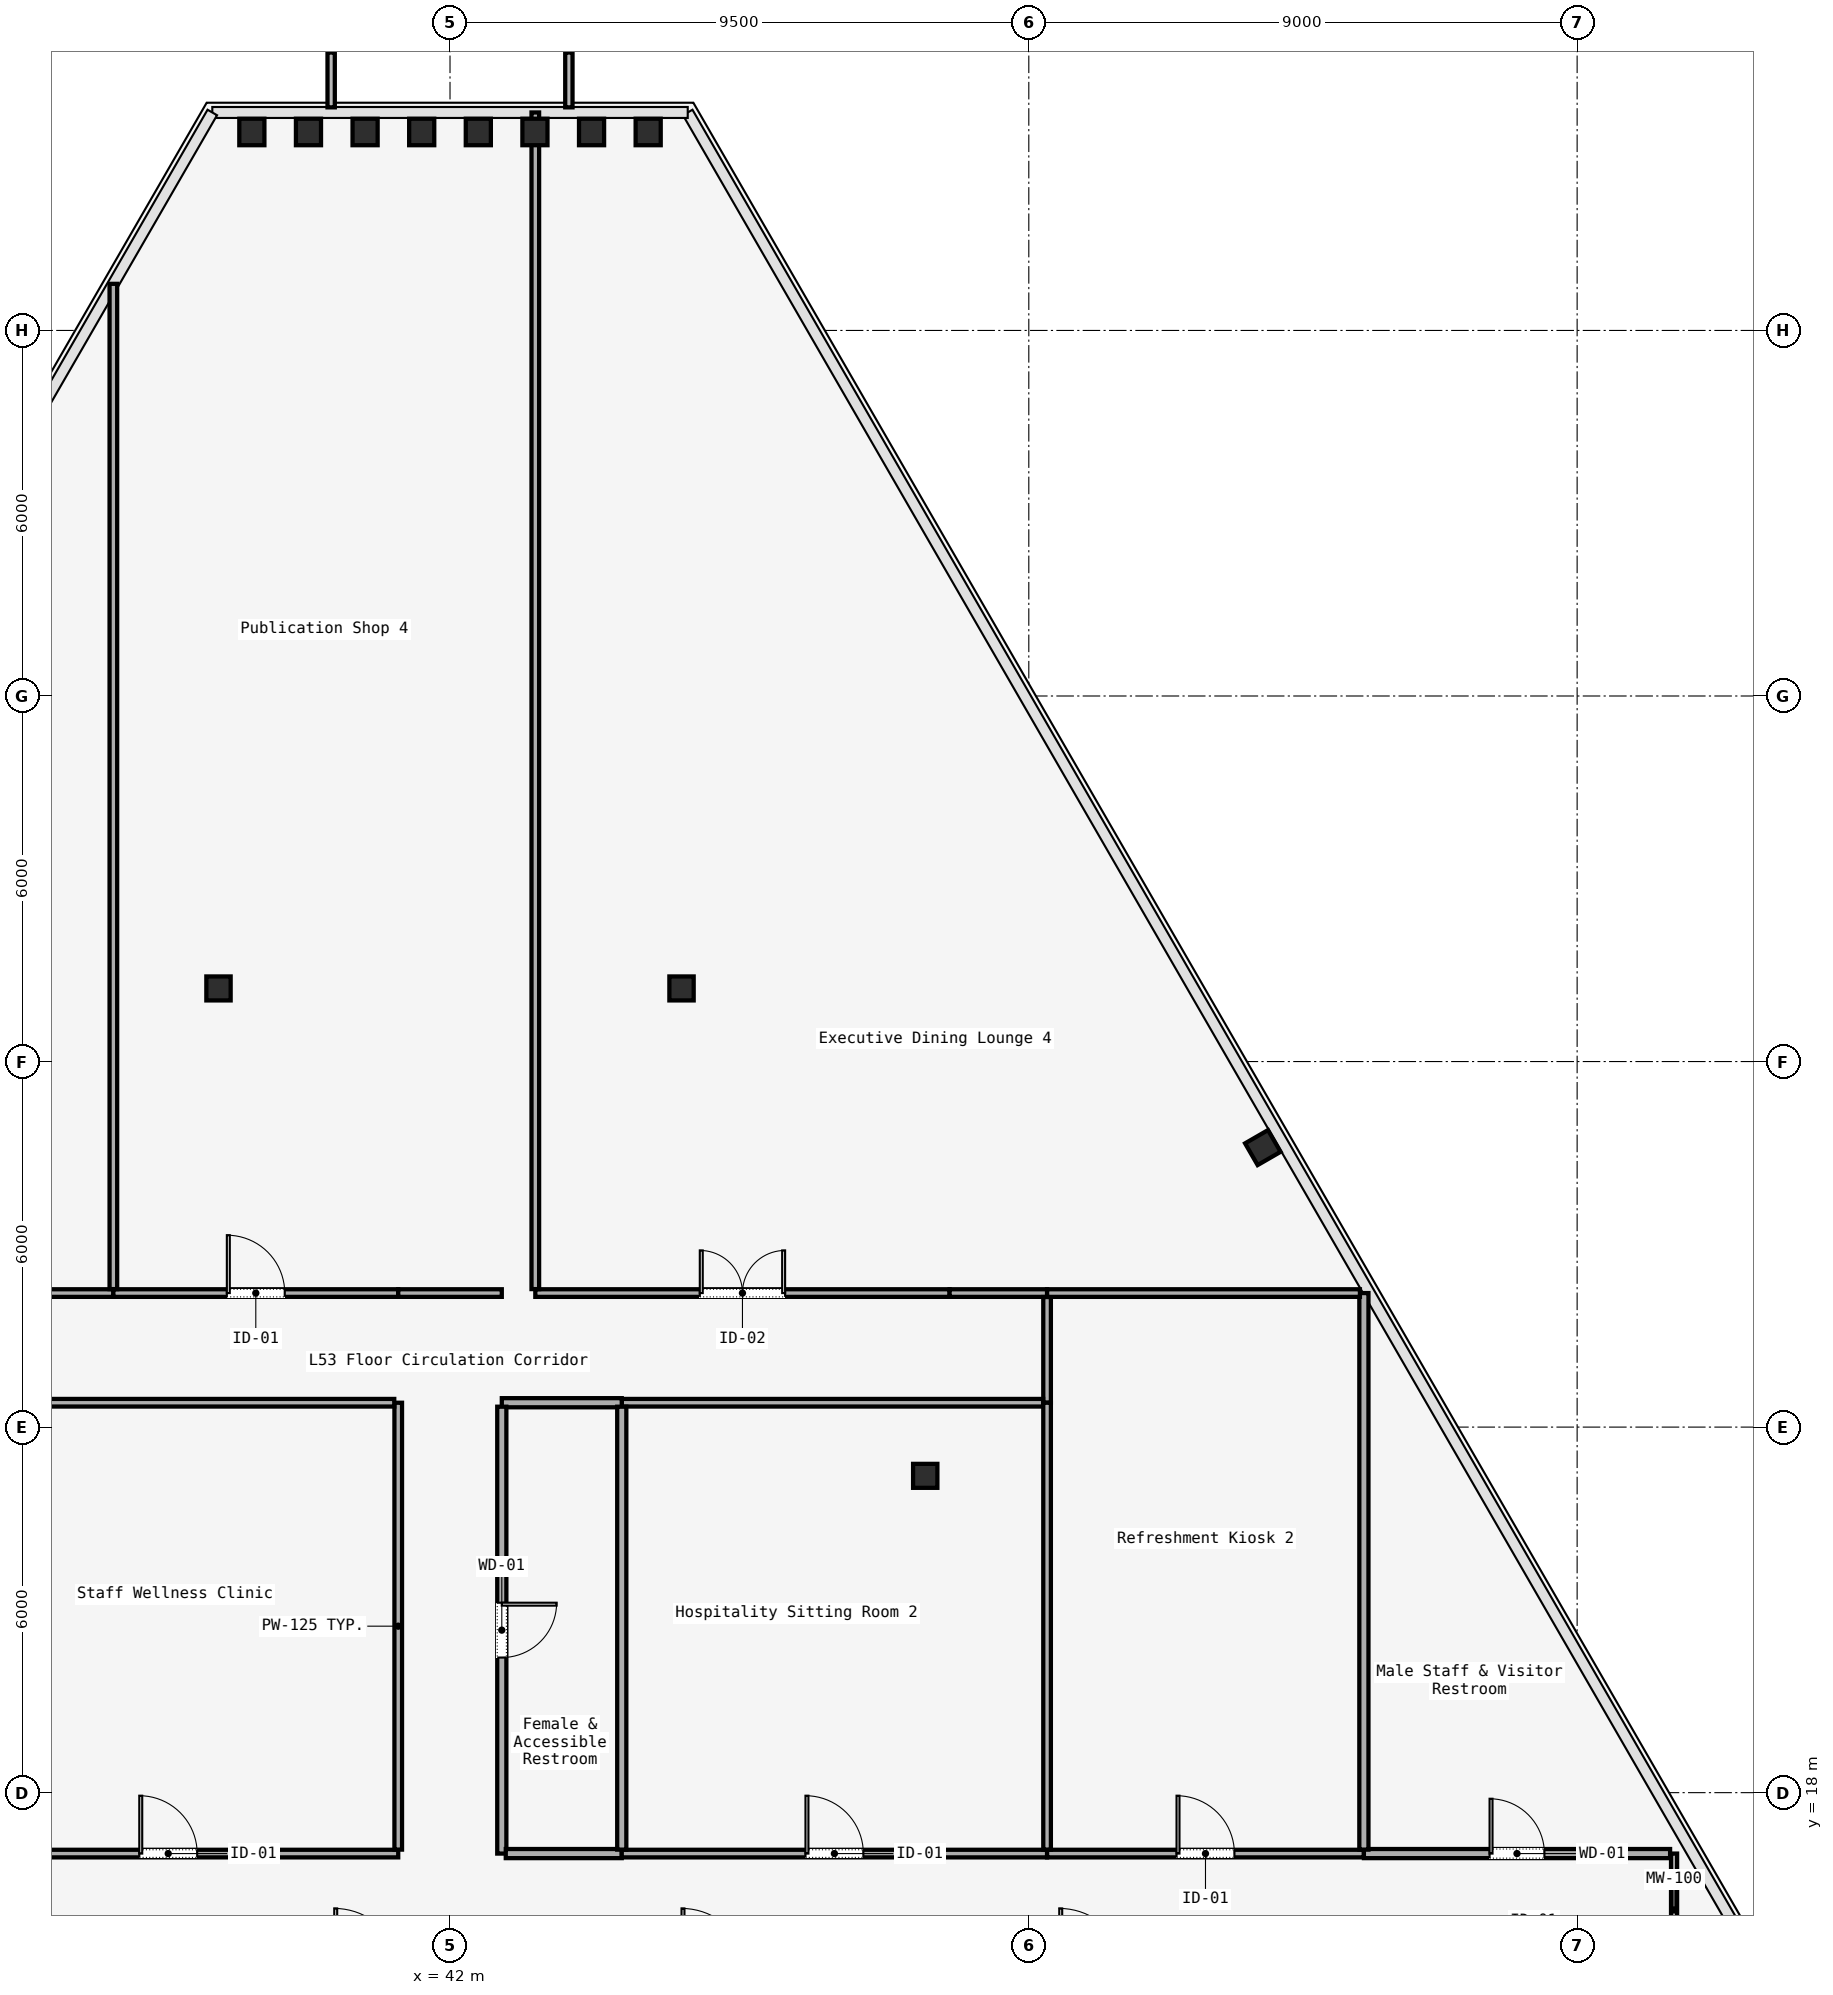
"""IFC4 building model, lengths in metres.
Left out: names, types, materials, properties, quantities, classifications, styles, units other than length and angle.
Written with IfcOpenShell. Run it as: python <this file> out.ifc"""

import sys

from ifc_helpers import new_model, si_unit, direction, frame, frame_2d, origin, origin_2d, place, context, subcontext, project, spatial, rectangle, i_section, extrude, element, fill, save


model = new_model("IFC4")
c1 = context("Model", 3, precision=1e-05, world=origin(), true_north=direction((0.0, 1.0)))
c2 = subcontext(c1, "Body", "Model", "MODEL_VIEW")
j1 = project(units=[si_unit("LENGTHUNIT", "METRE"), si_unit("PLANEANGLEUNIT", "RADIAN")], contexts=[c1])
p1 = place(None, origin())
s1 = spatial("IfcSite", under=j1, at=p1, CompositionType="ELEMENT")
p2 = place(p1, origin())
s2 = spatial("IfcBuilding", under=s1, at=p2, CompositionType="ELEMENT")
p3 = place(p2, frame((0.0, 0.0, 221.8)))
s3 = spatial("IfcBuildingStorey", under=s2, at=p3, CompositionType="ELEMENT", Elevation=221.8)
for number, where, z_axis, x_axis in (
    (1, (49.8, 23.2, 0.0), (0.0, 0.0, 1.0), (1.0, 0.0, 0.0)),
    (2, (38.2, 31.2, 0.0), (0.0, 0.0, 1.0), (1.0, 0.0, 0.0)),
    (3, (45.8, 31.2, 0.0), (0.0, 0.0, 1.0), (1.0, 0.0, 0.0)),
):
    element("IfcColumn", number, at=place(p3, frame(where, z_axis=z_axis, x_axis=x_axis)), inside=s3, PredefinedType="COLUMN", context=c2, shape_type="SweptSolid", body=[
        extrude(i_section(OverallWidth=0.399, OverallDepth=0.394, WebThickness=0.023, FlangeThickness=0.037, FilletRadius=0.015, at=origin_2d()), origin(), (0.0, 0.0, 1.0), 3.58),
    ])
for number, where, z_axis, x_axis in (
    (4, (55.341, 28.588, 0.0), (0.0, 0.0, 1.0), (-0.5, 0.866, 0.0)),
    (5, (45.252, 45.258, 0.0), (0.0, 0.0, 1.0), (1.0, 0.0, 0.0)),
    (6, (44.323, 45.258, 0.0), (0.0, 0.0, 1.0), (1.0, 0.0, 0.0)),
    (7, (43.394, 45.258, 0.0), (0.0, 0.0, 1.0), (1.0, 0.0, 0.0)),
    (8, (42.465, 45.258, 0.0), (0.0, 0.0, 1.0), (1.0, 0.0, 0.0)),
    (9, (41.535, 45.258, 0.0), (0.0, 0.0, 1.0), (1.0, 0.0, 0.0)),
    (10, (40.606, 45.258, 0.0), (0.0, 0.0, 1.0), (1.0, 0.0, 0.0)),
    (11, (39.677, 45.258, 0.0), (0.0, 0.0, 1.0), (1.0, 0.0, 0.0)),
    (12, (38.748, 45.258, 0.0), (0.0, 0.0, 1.0), (1.0, 0.0, 0.0)),
):
    element("IfcColumn", number, at=place(p3, frame(where, z_axis=z_axis, x_axis=x_axis)), inside=s3, PredefinedType="COLUMN", context=c2, shape_type="SweptSolid", body=[
        extrude(i_section(OverallWidth=0.412, OverallDepth=0.435, WebThickness=0.036, FlangeThickness=0.044, FilletRadius=0.015, at=origin_2d()), origin(), (0.0, 0.0, 1.0), 3.58),
    ])
p4 = place(p3, frame((62.091, 17.0, 0.0), z_axis=(0.0, 0.0, 1.0), x_axis=(0.0, -1.0, 0.0)))
e13 = element("IfcWall", 13, at=p4, inside=s3, PredefinedType="MOVABLE", context=c2, shape_type="SweptSolid", body=[
    extrude(rectangle(XDim=1.85, YDim=0.1, at=frame_2d((0.925, 0.0))), origin(), (0.0, 0.0, 1.0), 3.01),
])
p5 = place(p3, frame((33.6, 17.0, 0.0), z_axis=(0.0, 0.0, 1.0), x_axis=(1.0, 0.0, 0.0)))
e14 = element("IfcWall", 14, at=p5, inside=s3, PredefinedType="PARTITIONING", context=c2, shape_type="SweptSolid", body=[
    extrude(rectangle(XDim=7.55, YDim=0.125, at=frame_2d((3.775, 0.0))), origin(), (0.0, 0.0, 1.0), 3.01),
])
p6 = place(p5, frame((3.3, 0.0, 0.0)))
e15 = element("IfcOpeningElement", 15, at=p6, cuts=e14, PredefinedType="OPENING", context=c2, shape_type="SweptSolid", body=[
    extrude(rectangle(XDim=0.95, YDim=2.2, at=frame_2d((0.475, 1.1))), frame((0.0, 0.062, 0.0), z_axis=(0.0, -1.0, 0.0), x_axis=(1.0, 0.0, 0.0)), (0.0, 0.0, 1.0), 0.125),
])
p7 = place(p3, frame((41.15, 17.065, 0.0), z_axis=(0.0, 0.0, 1.0), x_axis=(0.0, 1.0, 0.0)))
e16 = element("IfcWall", 16, at=p7, inside=s3, PredefinedType="PARTITIONING", context=c2, shape_type="SweptSolid", body=[
    extrude(rectangle(XDim=7.335, YDim=0.125, at=frame_2d((3.667, 0.0))), origin(), (0.0, 0.0, 1.0), 3.01),
])
p8 = place(p3, frame((41.085, 24.4, 0.0), z_axis=(0.0, 0.0, 1.0), x_axis=(-1.0, 0.0, 0.0)))
e17 = element("IfcWall", 17, at=p8, inside=s3, PredefinedType="PARTITIONING", context=c2, shape_type="SweptSolid", body=[
    extrude(rectangle(XDim=7.485, YDim=0.125, at=frame_2d((3.742, 0.0))), origin(), (0.0, 0.0, 1.0), 3.01),
])
p9 = place(p3, frame((35.2, 26.2, 0.0), z_axis=(0.0, 0.0, 1.0), x_axis=(1.0, 0.0, 0.0)))
e18 = element("IfcWall", 18, at=p9, inside=s3, PredefinedType="PARTITIONING", context=c2, shape_type="SweptSolid", body=[
    extrude(rectangle(XDim=1.274, YDim=0.125, at=frame_2d((0.637, 0.0))), origin(), (0.0, 0.0, 1.0), 3.01),
])
p10 = place(p3, frame((36.474, 26.2, 0.0), z_axis=(0.0, 0.0, 1.0), x_axis=(1.0, 0.0, 0.0)))
e19 = element("IfcWall", 19, at=p10, inside=s3, PredefinedType="PARTITIONING", context=c2, shape_type="SweptSolid", body=[
    extrude(rectangle(XDim=4.676, YDim=0.125, at=frame_2d((2.338, 0.0))), origin(), (0.0, 0.0, 1.0), 3.01),
])
p11 = place(p10, frame((1.863, 0.0, 0.0)))
e20 = element("IfcOpeningElement", 20, at=p11, cuts=e19, PredefinedType="OPENING", context=c2, shape_type="SweptSolid", body=[
    extrude(rectangle(XDim=0.95, YDim=2.2, at=frame_2d((0.475, 1.1))), frame((0.0, 0.062, 0.0), z_axis=(0.0, -1.0, 0.0), x_axis=(1.0, 0.0, 0.0)), (0.0, 0.0, 1.0), 0.125),
])
p12 = place(p3, frame((41.15, 26.2, 0.0), z_axis=(0.0, 0.0, 1.0), x_axis=(1.0, 0.0, 0.0)))
e21 = element("IfcWall", 21, at=p12, inside=s3, PredefinedType="PARTITIONING", context=c2, shape_type="SweptSolid", body=[
    extrude(rectangle(XDim=1.7, YDim=0.125, at=frame_2d((0.85, 0.0))), origin(), (0.0, 0.0, 1.0), 3.01),
])
p13 = place(p3, frame((43.4, 26.2, 0.0), z_axis=(0.0, 0.0, 1.0), x_axis=(1.0, 0.0, 0.0)))
e22 = element("IfcWall", 22, at=p13, inside=s3, PredefinedType="PARTITIONING", context=c2, shape_type="SweptSolid", body=[
    extrude(rectangle(XDim=6.8, YDim=0.125, at=frame_2d((3.4, 0.0))), origin(), (0.0, 0.0, 1.0), 3.01),
])
p14 = place(p13, frame((2.7, 0.0, 0.0)))
e23 = element("IfcOpeningElement", 23, at=p14, cuts=e22, PredefinedType="OPENING", context=c2, shape_type="SweptSolid", body=[
    extrude(rectangle(XDim=1.4, YDim=2.2, at=frame_2d((0.7, 1.1))), frame((0.0, 0.062, 0.0), z_axis=(0.0, -1.0, 0.0), x_axis=(1.0, 0.0, 0.0)), (0.0, 0.0, 1.0), 0.125),
])
p15 = place(p3, frame((50.2, 26.2, 0.0), z_axis=(0.0, 0.0, 1.0), x_axis=(1.0, 0.0, 0.0)))
e24 = element("IfcWall", 24, at=p15, inside=s3, PredefinedType="PARTITIONING", context=c2, shape_type="SweptSolid", body=[
    extrude(rectangle(XDim=1.6, YDim=0.125, at=frame_2d((0.8, 0.0))), origin(), (0.0, 0.0, 1.0), 3.01),
])
p16 = place(p3, frame((51.8, 26.135, 0.0), z_axis=(0.0, 0.0, 1.0), x_axis=(0.0, -1.0, 0.0)))
e25 = element("IfcWall", 25, at=p16, inside=s3, PredefinedType="PARTITIONING", context=c2, shape_type="SweptSolid", body=[
    extrude(rectangle(XDim=1.735, YDim=0.125, at=frame_2d((0.868, 0.0))), origin(), (0.0, 0.0, 1.0), 3.01),
])
p17 = place(p3, frame((51.735, 24.4, 0.0), z_axis=(0.0, 0.0, 1.0), x_axis=(-1.0, 0.0, 0.0)))
e26 = element("IfcWall", 26, at=p17, inside=s3, PredefinedType="PARTITIONING", context=c2, shape_type="SweptSolid", body=[
    extrude(rectangle(XDim=6.916, YDim=0.125, at=frame_2d((3.458, 0.0))), origin(), (0.0, 0.0, 1.0), 3.01),
])
p18 = place(p3, frame((44.819, 24.4, 0.0), z_axis=(0.0, 0.0, 1.0), x_axis=(-1.0, 0.0, 0.0)))
e27 = element("IfcWall", 27, at=p18, inside=s3, PredefinedType="PARTITIONING", context=c2, shape_type="SweptSolid", body=[
    extrude(rectangle(XDim=1.969, YDim=0.15, at=frame_2d((0.984, 0.0))), origin(), (0.0, 0.0, 1.0), 3.01),
])
p19 = place(p3, frame((42.85, 24.335, 0.0), z_axis=(0.0, 0.0, 1.0), x_axis=(0.0, -1.0, 0.0)))
e28 = element("IfcWall", 28, at=p19, inside=s3, PredefinedType="PARTITIONING", context=c2, shape_type="SweptSolid", body=[
    extrude(rectangle(XDim=7.335, YDim=0.15, at=frame_2d((3.667, 0.0))), origin(), (0.0, 0.0, 1.0), 3.01),
])
p20 = place(p19, frame((3.218, 0.0, 0.0)))
e29 = element("IfcOpeningElement", 29, at=p20, cuts=e28, PredefinedType="OPENING", context=c2, shape_type="SweptSolid", body=[
    extrude(rectangle(XDim=0.9, YDim=2.15, at=frame_2d((0.45, 1.075))), frame((0.0, 0.075, 0.0), z_axis=(0.0, -1.0, 0.0), x_axis=(1.0, 0.0, 0.0)), (0.0, 0.0, 1.0), 0.15),
])
p21 = place(p3, frame((42.915, 17.0, 0.0), z_axis=(0.0, 0.0, 1.0), x_axis=(1.0, 0.0, 0.0)))
e30 = element("IfcWall", 30, at=p21, inside=s3, PredefinedType="PARTITIONING", context=c2, shape_type="SweptSolid", body=[
    extrude(rectangle(XDim=1.904, YDim=0.15, at=frame_2d((0.952, 0.0))), origin(), (0.0, 0.0, 1.0), 3.01),
])
p22 = place(p3, frame((44.819, 17.0, 0.0), z_axis=(0.0, 0.0, 1.0), x_axis=(1.0, 0.0, 0.0)))
e31 = element("IfcWall", 31, at=p22, inside=s3, PredefinedType="PARTITIONING", context=c2, shape_type="SweptSolid", body=[
    extrude(rectangle(XDim=6.981, YDim=0.125, at=frame_2d((3.49, 0.0))), origin(), (0.0, 0.0, 1.0), 3.01),
])
p23 = place(p22, frame((3.015, 0.0, 0.0)))
e32 = element("IfcOpeningElement", 32, at=p23, cuts=e31, PredefinedType="OPENING", context=c2, shape_type="SweptSolid", body=[
    extrude(rectangle(XDim=0.95, YDim=2.2, at=frame_2d((0.475, 1.1))), frame((0.0, 0.062, 0.0), z_axis=(0.0, -1.0, 0.0), x_axis=(1.0, 0.0, 0.0)), (0.0, 0.0, 1.0), 0.125),
])
p24 = place(p3, frame((51.8, 17.0, 0.0), z_axis=(0.0, 0.0, 1.0), x_axis=(1.0, 0.0, 0.0)))
e33 = element("IfcWall", 33, at=p24, inside=s3, PredefinedType="PARTITIONING", context=c2, shape_type="SweptSolid", body=[
    extrude(rectangle(XDim=5.2, YDim=0.125, at=frame_2d((2.6, 0.0))), origin(), (0.0, 0.0, 1.0), 3.01),
])
p25 = place(p24, frame((2.125, 0.0, 0.0)))
e34 = element("IfcOpeningElement", 34, at=p25, cuts=e33, PredefinedType="OPENING", context=c2, shape_type="SweptSolid", body=[
    extrude(rectangle(XDim=0.95, YDim=2.2, at=frame_2d((0.475, 1.1))), frame((0.0, 0.062, 0.0), z_axis=(0.0, -1.0, 0.0), x_axis=(1.0, 0.0, 0.0)), (0.0, 0.0, 1.0), 0.125),
])
p26 = place(p3, frame((57.0, 17.0, 0.0), z_axis=(0.0, 0.0, 1.0), x_axis=(1.0, 0.0, 0.0)))
e35 = element("IfcWall", 35, at=p26, inside=s3, PredefinedType="PARTITIONING", context=c2, shape_type="SweptSolid", body=[
    extrude(rectangle(XDim=5.026, YDim=0.15, at=frame_2d((2.513, 0.0))), origin(), (0.0, 0.0, 1.0), 3.01),
])
p27 = place(p26, frame((2.063, 0.0, 0.0)))
e36 = element("IfcOpeningElement", 36, at=p27, cuts=e35, PredefinedType="OPENING", context=c2, shape_type="SweptSolid", body=[
    extrude(rectangle(XDim=0.9, YDim=2.15, at=frame_2d((0.45, 1.075))), frame((0.0, 0.075, 0.0), z_axis=(0.0, -1.0, 0.0), x_axis=(1.0, 0.0, 0.0)), (0.0, 0.0, 1.0), 0.15),
])
p28 = place(p3, frame((57.0, 17.065, 0.0), z_axis=(0.0, 0.0, 1.0), x_axis=(0.0, 1.0, 0.0)))
e37 = element("IfcWall", 37, at=p28, inside=s3, PredefinedType="PARTITIONING", context=c2, shape_type="SweptSolid", body=[
    extrude(rectangle(XDim=9.135, YDim=0.15, at=frame_2d((4.567, 0.0))), origin(), (0.0, 0.0, 1.0), 3.01),
])
p29 = place(p3, frame((44.819, 24.335, 0.0), z_axis=(0.0, 0.0, 1.0), x_axis=(0.0, -1.0, 0.0)))
e38 = element("IfcWall", 38, at=p29, inside=s3, PredefinedType="PARTITIONING", context=c2, shape_type="SweptSolid", body=[
    extrude(rectangle(XDim=7.27, YDim=0.15, at=frame_2d((3.635, 0.0))), origin(), (0.0, 0.0, 1.0), 3.01),
])
p30 = place(p3, frame((51.8, 24.4, 0.0), z_axis=(0.0, 0.0, 1.0), x_axis=(0.0, -1.0, 0.0)))
e39 = element("IfcWall", 39, at=p30, inside=s3, PredefinedType="PARTITIONING", context=c2, shape_type="SweptSolid", body=[
    extrude(rectangle(XDim=7.335, YDim=0.125, at=frame_2d((3.667, 0.0))), origin(), (0.0, 0.0, 1.0), 3.01),
])
p31 = place(p3, frame((51.8, 26.2, 0.0), z_axis=(0.0, 0.0, 1.0), x_axis=(1.0, 0.0, 0.0)))
e40 = element("IfcWall", 40, at=p31, inside=s3, PredefinedType="PARTITIONING", context=c2, shape_type="SweptSolid", body=[
    extrude(rectangle(XDim=5.135, YDim=0.125, at=frame_2d((2.567, 0.0))), origin(), (0.0, 0.0, 1.0), 3.01),
])
p32 = place(p3, frame((36.474, 42.765, 0.0), z_axis=(0.0, 0.0, 1.0), x_axis=(0.0, -1.0, 0.0)))
e41 = element("IfcWall", 41, at=p32, inside=s3, PredefinedType="PARTITIONING", context=c2, shape_type="SweptSolid", body=[
    extrude(rectangle(XDim=16.5, YDim=0.125, at=frame_2d((8.25, 0.0))), origin(), (0.0, 0.0, 1.0), 3.01),
])
p33 = place(p3, frame((43.4, 26.265, 0.0), z_axis=(0.0, 0.0, 1.0), x_axis=(0.0, 1.0, 0.0)))
e42 = element("IfcWall", 42, at=p33, inside=s3, PredefinedType="PARTITIONING", context=c2, shape_type="SweptSolid", body=[
    extrude(rectangle(XDim=19.313, YDim=0.125, at=frame_2d((9.656, 0.0))), origin(), (0.0, 0.0, 1.0), 3.01),
])
p34 = place(p27, origin())
e43 = element("IfcDoor", 43, at=p34, inside=s3, OperationType="SINGLE_SWING_RIGHT", PredefinedType="DOOR", context=c2, shape_type="SweptSolid", body=[
    extrude(rectangle(XDim=0.9, YDim=2.15, at=frame_2d((0.45, 1.075))), frame((0.0, 0.025, 0.0), z_axis=(0.0, -1.0, 0.0), x_axis=(1.0, 0.0, 0.0)), (0.0, 0.0, 1.0), 0.05),
])
fill(e36, e43)
p35 = place(p6, origin())
e44 = element("IfcDoor", 44, at=p35, inside=s3, OperationType="SINGLE_SWING_RIGHT", PredefinedType="DOOR", context=c2, shape_type="SweptSolid", body=[
    extrude(rectangle(XDim=0.95, YDim=2.2, at=frame_2d((0.475, 1.1))), frame((0.0, 0.025, 0.0), z_axis=(0.0, -1.0, 0.0), x_axis=(1.0, 0.0, 0.0)), (0.0, 0.0, 1.0), 0.05),
])
fill(e15, e44)
p36 = place(p20, origin())
e45 = element("IfcDoor", 45, at=p36, inside=s3, OperationType="SINGLE_SWING_LEFT", PredefinedType="DOOR", context=c2, shape_type="SweptSolid", body=[
    extrude(rectangle(XDim=0.9, YDim=2.15, at=frame_2d((0.45, 1.075))), frame((0.0, 0.025, 0.0), z_axis=(0.0, -1.0, 0.0), x_axis=(1.0, 0.0, 0.0)), (0.0, 0.0, 1.0), 0.05),
])
fill(e29, e45)
p37 = place(p23, origin())
e46 = element("IfcDoor", 46, at=p37, inside=s3, OperationType="SINGLE_SWING_RIGHT", PredefinedType="DOOR", context=c2, shape_type="SweptSolid", body=[
    extrude(rectangle(XDim=0.95, YDim=2.2, at=frame_2d((0.475, 1.1))), frame((0.0, 0.025, 0.0), z_axis=(0.0, -1.0, 0.0), x_axis=(1.0, 0.0, 0.0)), (0.0, 0.0, 1.0), 0.05),
])
fill(e32, e46)
p38 = place(p25, origin())
e47 = element("IfcDoor", 47, at=p38, inside=s3, OperationType="SINGLE_SWING_RIGHT", PredefinedType="DOOR", context=c2, shape_type="SweptSolid", body=[
    extrude(rectangle(XDim=0.95, YDim=2.2, at=frame_2d((0.475, 1.1))), frame((0.0, 0.025, 0.0), z_axis=(0.0, -1.0, 0.0), x_axis=(1.0, 0.0, 0.0)), (0.0, 0.0, 1.0), 0.05),
])
fill(e34, e47)
p39 = place(p14, origin())
e48 = element("IfcDoor", 48, at=p39, inside=s3, OperationType="SINGLE_SWING_RIGHT", PredefinedType="DOOR", context=c2, shape_type="SweptSolid", body=[
    extrude(rectangle(XDim=1.4, YDim=2.2, at=frame_2d((0.7, 1.1))), frame((0.0, 0.025, 0.0), z_axis=(0.0, -1.0, 0.0), x_axis=(1.0, 0.0, 0.0)), (0.0, 0.0, 1.0), 0.05),
])
fill(e23, e48)
p40 = place(p11, origin())
e49 = element("IfcDoor", 49, at=p40, inside=s3, OperationType="SINGLE_SWING_LEFT", PredefinedType="DOOR", context=c2, shape_type="SweptSolid", body=[
    extrude(rectangle(XDim=0.95, YDim=2.2, at=frame_2d((0.475, 1.1))), frame((0.0, 0.025, 0.0), z_axis=(0.0, -1.0, 0.0), x_axis=(1.0, 0.0, 0.0)), (0.0, 0.0, 1.0), 0.05),
])
fill(e20, e49)
save(model, sys.argv[1])
